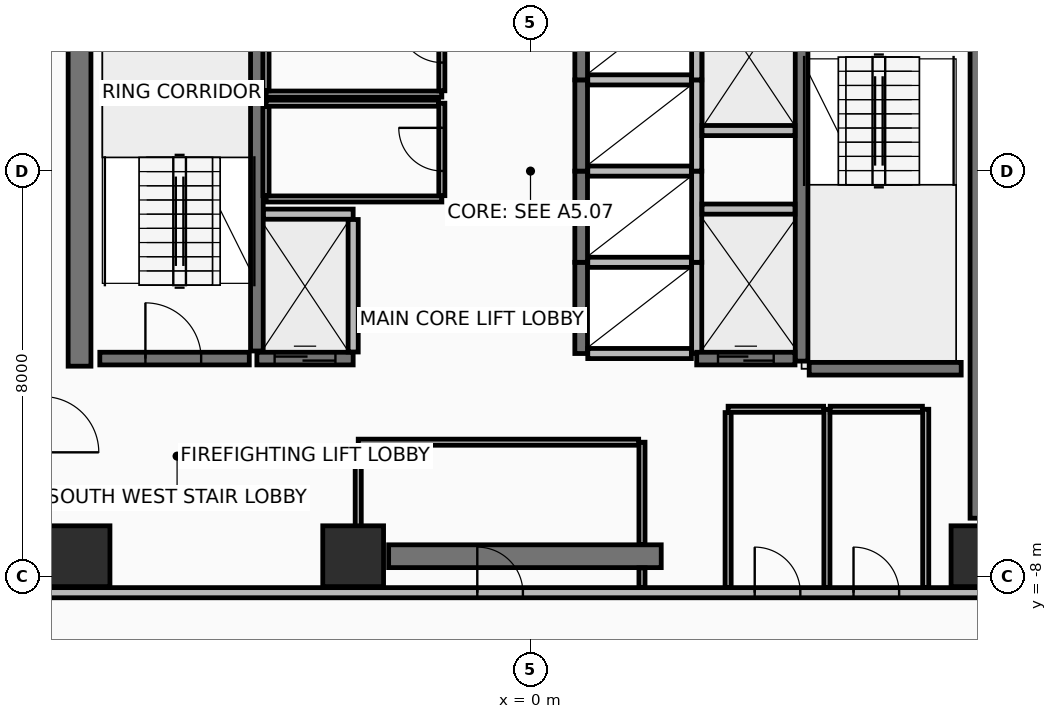
"""IFC4 building model, lengths in metres.
Left out: names, types, materials, properties, quantities, classifications, styles, units other than length and angle.
Written with IfcOpenShell. Run it as: python <this file> out.ifc"""

import sys

from ifc_helpers import new_model, si_unit, direction, frame, frame_2d, origin, origin_2d, place, context, subcontext, project, spatial, rectangle, extrude, element, fill, save


model = new_model("IFC4")
c1 = context("Model", 3, precision=1e-05, world=origin(), true_north=direction((0.0, 1.0)))
c2 = subcontext(c1, "Body", "Model", "MODEL_VIEW")
j1 = project(units=[si_unit("LENGTHUNIT", "METRE"), si_unit("PLANEANGLEUNIT", "RADIAN")], contexts=[c1])
p1 = place(None, origin())
s1 = spatial("IfcSite", under=j1, at=p1, CompositionType="ELEMENT")
p2 = place(p1, origin())
s2 = spatial("IfcBuilding", under=s1, at=p2, CompositionType="ELEMENT")
p3 = place(p2, frame((0.0, 0.0, 100.5)))
s3 = spatial("IfcBuildingStorey", under=s2, at=p3, CompositionType="ELEMENT", Elevation=100.5)
for number, where, z_axis, x_axis in (
    (1, (-8.9, -7.6, 0.0), (0.0, 0.0, 1.0), (1.0, 0.0, 0.0)),
    (2, (-3.5, -7.6, 0.0), (0.0, 0.0, 1.0), (1.0, 0.0, 0.0)),
    (3, (8.9, -7.6, 0.0), (0.0, 0.0, 1.0), (1.0, 0.0, 0.0)),
):
    element("IfcColumn", number, at=place(p3, frame(where, z_axis=z_axis, x_axis=x_axis)), inside=s3, PredefinedType="COLUMN", context=c2, shape_type="SweptSolid", body=[
        extrude(rectangle(XDim=1.2, YDim=1.2, at=origin_2d()), origin(), (0.0, 0.0, 1.0), 3.6),
    ])
p4 = place(p3, frame((-2.8, -7.6, 0.0), z_axis=(0.0, 0.0, 1.0), x_axis=(1.0, 0.0, 0.0)))
e4 = element("IfcWall", 4, at=p4, inside=s3, PredefinedType="SHEAR", context=c2, shape_type="SweptSolid", body=[
    extrude(rectangle(XDim=5.38, YDim=0.45, at=frame_2d((2.69, 0.0))), origin(), (0.0, 0.0, 1.0), 3.41),
])
for number, where, z_axis, x_axis in (
    (5, (-8.9, -3.85, 0.0), (0.0, 0.0, 1.0), (0.0, 1.0, 0.0)),
    (6, (8.9, -6.85, 0.0), (0.0, 0.0, 1.0), (0.0, 1.0, 0.0)),
):
    element("IfcWall", number, at=place(p3, frame(where, z_axis=z_axis, x_axis=x_axis)), inside=s3, PredefinedType="SHEAR", context=c2, shape_type="SweptSolid", body=[
        extrude(rectangle(XDim=10.7, YDim=0.45, at=frame_2d((5.35, 0.0))), origin(), (0.0, 0.0, 1.0), 3.41),
    ])
p5 = place(p3, frame((-9.62, -8.32, 0.0), z_axis=(0.0, 0.0, 1.0), x_axis=(1.0, 0.0, 0.0)))
e7 = element("IfcWall", 7, at=p5, inside=s3, PredefinedType="PARTITIONING", context=c2, shape_type="SweptSolid", body=[
    extrude(rectangle(XDim=19.24, YDim=0.2, at=frame_2d((9.62, 0.0))), origin(), (0.0, 0.0, 1.0), 2.805),
])
p6 = place(p5, frame((8.57, 0.0, 0.0)))
e8 = element("IfcOpeningElement", 8, at=p6, cuts=e7, PredefinedType="OPENING", context=c2, shape_type="SweptSolid", body=[
    extrude(rectangle(XDim=0.9, YDim=2.1, at=frame_2d((0.45, 1.05))), frame((0.0, 0.11, 0.0), z_axis=(0.0, -1.0, 0.0), x_axis=(1.0, 0.0, 0.0)), (0.0, 0.0, 1.0), 0.22),
])
p7 = place(p5, frame((14.045, 0.0, 0.0)))
e9 = element("IfcOpeningElement", 9, at=p7, cuts=e7, PredefinedType="OPENING", context=c2, shape_type="SweptSolid", body=[
    extrude(rectangle(XDim=0.9, YDim=2.1, at=frame_2d((0.45, 1.05))), frame((0.0, 0.11, 0.0), z_axis=(0.0, -1.0, 0.0), x_axis=(1.0, 0.0, 0.0)), (0.0, 0.0, 1.0), 0.22),
])
p8 = place(p5, frame((15.995, 0.0, 0.0)))
e10 = element("IfcOpeningElement", 10, at=p8, cuts=e7, PredefinedType="OPENING", context=c2, shape_type="SweptSolid", body=[
    extrude(rectangle(XDim=0.9, YDim=2.1, at=frame_2d((0.45, 1.05))), frame((0.0, 0.11, 0.0), z_axis=(0.0, -1.0, 0.0), x_axis=(1.0, 0.0, 0.0)), (0.0, 0.0, 1.0), 0.22),
])
p9 = place(p3, frame((-5.4, -3.55, 0.0), z_axis=(0.0, 0.0, 1.0), x_axis=(0.0, 1.0, 0.0)))
e11 = element("IfcWall", 11, at=p9, inside=s3, PredefinedType="SHEAR", context=c2, shape_type="SweptSolid", body=[
    extrude(rectangle(XDim=7.3, YDim=0.25, at=frame_2d((3.65, 0.0))), origin(), (0.0, 0.0, 1.0), 3.41),
])
p10 = place(p3, frame((-8.5, -3.7, 0.0), z_axis=(0.0, 0.0, 1.0), x_axis=(1.0, 0.0, 0.0)))
e12 = element("IfcWall", 12, at=p10, inside=s3, PredefinedType="SHEAR", context=c2, shape_type="SweptSolid", body=[
    extrude(rectangle(XDim=2.95, YDim=0.25, at=frame_2d((1.475, 0.0))), origin(), (0.0, 0.0, 1.0), 3.41),
])
p11 = place(p10, frame((0.9, 0.0, 0.0)))
e13 = element("IfcOpeningElement", 13, at=p11, cuts=e12, PredefinedType="OPENING", context=c2, shape_type="SweptSolid", body=[
    extrude(rectangle(XDim=1.1, YDim=2.15, at=frame_2d((0.55, 1.075))), frame((0.0, 0.135, 0.0), z_axis=(0.0, -1.0, 0.0), x_axis=(1.0, 0.0, 0.0)), (0.0, 0.0, 1.0), 0.27),
])
p12 = place(p3, frame((5.35, -3.75, 0.0), z_axis=(0.0, 0.0, 1.0), x_axis=(0.0, 1.0, 0.0)))
e14 = element("IfcWall", 14, at=p12, inside=s3, PredefinedType="SHEAR", context=c2, shape_type="SweptSolid", body=[
    extrude(rectangle(XDim=7.3, YDim=0.25, at=frame_2d((3.65, 0.0))), origin(), (0.0, 0.0, 1.0), 3.41),
])
p13 = place(p3, frame((5.5, -3.9, 0.0), z_axis=(0.0, 0.0, 1.0), x_axis=(1.0, 0.0, 0.0)))
e15 = element("IfcWall", 15, at=p13, inside=s3, PredefinedType="SHEAR", context=c2, shape_type="SweptSolid", body=[
    extrude(rectangle(XDim=3.0, YDim=0.25, at=frame_2d((1.5, 0.0))), origin(), (0.0, 0.0, 1.0), 3.41),
])
p14 = place(p3, frame((1.0, -3.6, 0.0), z_axis=(0.0, 0.0, 1.0), x_axis=(0.0, 1.0, 0.0)))
e16 = element("IfcWall", 16, at=p14, inside=s3, PredefinedType="SHEAR", context=c2, shape_type="SweptSolid", body=[
    extrude(rectangle(XDim=1.8, YDim=0.25, at=frame_2d((0.9, 0.0))), origin(), (0.0, 0.0, 1.0), 3.41),
])
p15 = place(p3, frame((3.28, -3.6, 0.0), z_axis=(0.0, 0.0, 1.0), x_axis=(0.0, 1.0, 0.0)))
e17 = element("IfcWall", 17, at=p15, inside=s3, PredefinedType="PARTITIONING", context=c2, shape_type="SweptSolid", body=[
    extrude(rectangle(XDim=1.8, YDim=0.2, at=frame_2d((0.9, 0.0))), origin(), (0.0, 0.0, 1.0), 3.41),
])
for number, where, z_axis, x_axis in (
    (18, (1.13, -3.6, 0.0), (0.0, 0.0, 1.0), (1.0, 0.0, 0.0)),
    (19, (1.13, -1.8, 0.0), (0.0, 0.0, 1.0), (1.0, 0.0, 0.0)),
):
    element("IfcWall", number, at=place(p3, frame(where, z_axis=z_axis, x_axis=x_axis)), inside=s3, PredefinedType="PARTITIONING", context=c2, shape_type="SweptSolid", body=[
        extrude(rectangle(XDim=2.045, YDim=0.2, at=frame_2d((1.022, 0.0))), origin(), (0.0, 0.0, 1.0), 3.41),
    ])
p16 = place(p3, frame((1.0, -1.8, 0.0), z_axis=(0.0, 0.0, 1.0), x_axis=(0.0, 1.0, 0.0)))
e20 = element("IfcWall", 20, at=p16, inside=s3, PredefinedType="SHEAR", context=c2, shape_type="SweptSolid", body=[
    extrude(rectangle(XDim=1.8, YDim=0.25, at=frame_2d((0.9, 0.0))), origin(), (0.0, 0.0, 1.0), 3.41),
])
p17 = place(p3, frame((3.28, -1.8, 0.0), z_axis=(0.0, 0.0, 1.0), x_axis=(0.0, 1.0, 0.0)))
e21 = element("IfcWall", 21, at=p17, inside=s3, PredefinedType="PARTITIONING", context=c2, shape_type="SweptSolid", body=[
    extrude(rectangle(XDim=1.8, YDim=0.2, at=frame_2d((0.9, 0.0))), origin(), (0.0, 0.0, 1.0), 3.41),
])
p18 = place(p3, frame((1.13, 0.0, 0.0), z_axis=(0.0, 0.0, 1.0), x_axis=(1.0, 0.0, 0.0)))
e22 = element("IfcWall", 22, at=p18, inside=s3, PredefinedType="PARTITIONING", context=c2, shape_type="SweptSolid", body=[
    extrude(rectangle(XDim=2.045, YDim=0.2, at=frame_2d((1.022, 0.0))), origin(), (0.0, 0.0, 1.0), 3.41),
])
p19 = place(p3, frame((1.0, 0.0, 0.0), z_axis=(0.0, 0.0, 1.0), x_axis=(0.0, 1.0, 0.0)))
e23 = element("IfcWall", 23, at=p19, inside=s3, PredefinedType="SHEAR", context=c2, shape_type="SweptSolid", body=[
    extrude(rectangle(XDim=1.8, YDim=0.25, at=frame_2d((0.9, 0.0))), origin(), (0.0, 0.0, 1.0), 3.41),
])
p20 = place(p3, frame((3.28, 0.0, 0.0), z_axis=(0.0, 0.0, 1.0), x_axis=(0.0, 1.0, 0.0)))
e24 = element("IfcWall", 24, at=p20, inside=s3, PredefinedType="PARTITIONING", context=c2, shape_type="SweptSolid", body=[
    extrude(rectangle(XDim=1.8, YDim=0.2, at=frame_2d((0.9, 0.0))), origin(), (0.0, 0.0, 1.0), 3.41),
])
p21 = place(p3, frame((1.13, 1.8, 0.0), z_axis=(0.0, 0.0, 1.0), x_axis=(1.0, 0.0, 0.0)))
e25 = element("IfcWall", 25, at=p21, inside=s3, PredefinedType="PARTITIONING", context=c2, shape_type="SweptSolid", body=[
    extrude(rectangle(XDim=2.045, YDim=0.2, at=frame_2d((1.022, 0.0))), origin(), (0.0, 0.0, 1.0), 3.41),
])
p22 = place(p3, frame((1.0, 1.8, 0.0), z_axis=(0.0, 0.0, 1.0), x_axis=(0.0, 1.0, 0.0)))
e26 = element("IfcWall", 26, at=p22, inside=s3, PredefinedType="SHEAR", context=c2, shape_type="SweptSolid", body=[
    extrude(rectangle(XDim=1.8, YDim=0.25, at=frame_2d((0.9, 0.0))), origin(), (0.0, 0.0, 1.0), 3.41),
])
p23 = place(p3, frame((3.28, 1.8, 0.0), z_axis=(0.0, 0.0, 1.0), x_axis=(0.0, 1.0, 0.0)))
e27 = element("IfcWall", 27, at=p23, inside=s3, PredefinedType="PARTITIONING", context=c2, shape_type="SweptSolid", body=[
    extrude(rectangle(XDim=1.8, YDim=0.2, at=frame_2d((0.9, 0.0))), origin(), (0.0, 0.0, 1.0), 3.41),
])
p24 = place(p3, frame((-5.4, -3.7, 0.0), z_axis=(0.0, 0.0, 1.0), x_axis=(1.0, 0.0, 0.0)))
e28 = element("IfcWall", 28, at=p24, inside=s3, PredefinedType="SHEAR", context=c2, shape_type="SweptSolid", body=[
    extrude(rectangle(XDim=1.9, YDim=0.25, at=frame_2d((0.95, 0.0))), origin(), (0.0, 0.0, 1.0), 3.41),
])
p25 = place(p24, frame((0.35, 0.0, 0.0)))
e29 = element("IfcOpeningElement", 29, at=p25, cuts=e28, PredefinedType="OPENING", context=c2, shape_type="SweptSolid", body=[
    extrude(rectangle(XDim=1.2, YDim=2.2, at=frame_2d((0.6, 1.1))), frame((0.0, 0.135, 0.0), z_axis=(0.0, -1.0, 0.0), x_axis=(1.0, 0.0, 0.0)), (0.0, 0.0, 1.0), 0.27),
])
p26 = place(p3, frame((-5.27, -0.85, 0.0), z_axis=(0.0, 0.0, 1.0), x_axis=(1.0, 0.0, 0.0)))
e30 = element("IfcWall", 30, at=p26, inside=s3, PredefinedType="PARTITIONING", context=c2, shape_type="SweptSolid", body=[
    extrude(rectangle(XDim=1.77, YDim=0.2, at=frame_2d((0.885, 0.0))), origin(), (0.0, 0.0, 1.0), 3.41),
])
p27 = place(p3, frame((-3.5, -3.57, 0.0), z_axis=(0.0, 0.0, 1.0), x_axis=(0.0, 1.0, 0.0)))
e31 = element("IfcWall", 31, at=p27, inside=s3, PredefinedType="PARTITIONING", context=c2, shape_type="SweptSolid", body=[
    extrude(rectangle(XDim=2.615, YDim=0.2, at=frame_2d((1.308, 0.0))), origin(), (0.0, 0.0, 1.0), 3.41),
])
p28 = place(p3, frame((3.385, 0.8, 0.0), z_axis=(0.0, 0.0, 1.0), x_axis=(1.0, 0.0, 0.0)))
e32 = element("IfcWall", 32, at=p28, inside=s3, PredefinedType="PARTITIONING", context=c2, shape_type="SweptSolid", body=[
    extrude(rectangle(XDim=1.835, YDim=0.2, at=frame_2d((0.917, 0.0))), origin(), (0.0, 0.0, 1.0), 3.41),
])
p29 = place(p3, frame((3.28, -3.7, 0.0), z_axis=(0.0, 0.0, 1.0), x_axis=(1.0, 0.0, 0.0)))
e33 = element("IfcWall", 33, at=p29, inside=s3, PredefinedType="SHEAR", context=c2, shape_type="SweptSolid", body=[
    extrude(rectangle(XDim=1.94, YDim=0.25, at=frame_2d((0.97, 0.0))), origin(), (0.0, 0.0, 1.0), 3.41),
])
p30 = place(p29, frame((0.42, 0.0, 0.0)))
e34 = element("IfcOpeningElement", 34, at=p30, cuts=e33, PredefinedType="OPENING", context=c2, shape_type="SweptSolid", body=[
    extrude(rectangle(XDim=1.1, YDim=2.2, at=frame_2d((0.55, 1.1))), frame((0.0, 0.135, 0.0), z_axis=(0.0, -1.0, 0.0), x_axis=(1.0, 0.0, 0.0)), (0.0, 0.0, 1.0), 0.27),
])
p31 = place(p3, frame((3.385, -0.75, 0.0), z_axis=(0.0, 0.0, 1.0), x_axis=(1.0, 0.0, 0.0)))
e35 = element("IfcWall", 35, at=p31, inside=s3, PredefinedType="PARTITIONING", context=c2, shape_type="SweptSolid", body=[
    extrude(rectangle(XDim=1.835, YDim=0.2, at=frame_2d((0.917, 0.0))), origin(), (0.0, 0.0, 1.0), 3.41),
])
p32 = place(p3, frame((-5.22, 1.52, 0.0), z_axis=(0.0, 0.0, 1.0), x_axis=(1.0, 0.0, 0.0)))
e36 = element("IfcWall", 36, at=p32, inside=s3, PredefinedType="PARTITIONING", context=c2, shape_type="SweptSolid", body=[
    extrude(rectangle(XDim=3.47, YDim=0.12, at=frame_2d((1.735, 0.0))), origin(), (0.0, 0.0, 1.0), 3.41),
])
p33 = place(p3, frame((-1.75, 1.585, 0.0), z_axis=(0.0, 0.0, 1.0), x_axis=(0.0, 1.0, 0.0)))
e37 = element("IfcWall", 37, at=p33, inside=s3, PredefinedType="PARTITIONING", context=c2, shape_type="SweptSolid", body=[
    extrude(rectangle(XDim=1.965, YDim=0.12, at=frame_2d((0.982, 0.0))), origin(), (0.0, 0.0, 1.0), 3.41),
])
p34 = place(p33, frame((0.557, 0.0, 0.0)))
e38 = element("IfcOpeningElement", 38, at=p34, cuts=e37, PredefinedType="OPENING", context=c2, shape_type="SweptSolid", body=[
    extrude(rectangle(XDim=0.85, YDim=2.1, at=frame_2d((0.425, 1.05))), frame((0.0, 0.07, 0.0), z_axis=(0.0, -1.0, 0.0), x_axis=(1.0, 0.0, 0.0)), (0.0, 0.0, 1.0), 0.14),
])
p35 = place(p3, frame((-5.22, 3.485, 0.0), z_axis=(0.0, 0.0, 1.0), x_axis=(0.0, -1.0, 0.0)))
e39 = element("IfcWall", 39, at=p35, inside=s3, PredefinedType="PARTITIONING", context=c2, shape_type="SweptSolid", body=[
    extrude(rectangle(XDim=1.9, YDim=0.12, at=frame_2d((0.95, 0.0))), origin(), (0.0, 0.0, 1.0), 3.41),
])
p36 = place(p3, frame((-5.22, -0.55, 0.0), z_axis=(0.0, 0.0, 1.0), x_axis=(1.0, 0.0, 0.0)))
e40 = element("IfcWall", 40, at=p36, inside=s3, PredefinedType="PARTITIONING", context=c2, shape_type="SweptSolid", body=[
    extrude(rectangle(XDim=3.47, YDim=0.12, at=frame_2d((1.735, 0.0))), origin(), (0.0, 0.0, 1.0), 3.41),
])
p37 = place(p3, frame((-1.75, -0.485, 0.0), z_axis=(0.0, 0.0, 1.0), x_axis=(0.0, 1.0, 0.0)))
e41 = element("IfcWall", 41, at=p37, inside=s3, PredefinedType="PARTITIONING", context=c2, shape_type="SweptSolid", body=[
    extrude(rectangle(XDim=1.825, YDim=0.12, at=frame_2d((0.913, 0.0))), origin(), (0.0, 0.0, 1.0), 3.41),
])
p38 = place(p37, frame((0.488, 0.0, 0.0)))
e42 = element("IfcOpeningElement", 42, at=p38, cuts=e41, PredefinedType="OPENING", context=c2, shape_type="SweptSolid", body=[
    extrude(rectangle(XDim=0.85, YDim=2.1, at=frame_2d((0.425, 1.05))), frame((0.0, 0.07, 0.0), z_axis=(0.0, -1.0, 0.0), x_axis=(1.0, 0.0, 0.0)), (0.0, 0.0, 1.0), 0.14),
])
p39 = place(p3, frame((-1.815, 1.34, 0.0), z_axis=(0.0, 0.0, 1.0), x_axis=(-1.0, 0.0, 0.0)))
e43 = element("IfcWall", 43, at=p39, inside=s3, PredefinedType="PARTITIONING", context=c2, shape_type="SweptSolid", body=[
    extrude(rectangle(XDim=3.405, YDim=0.12, at=frame_2d((1.703, 0.0))), origin(), (0.0, 0.0, 1.0), 3.41),
])
p40 = place(p3, frame((-5.22, 1.275, 0.0), z_axis=(0.0, 0.0, 1.0), x_axis=(0.0, -1.0, 0.0)))
e44 = element("IfcWall", 44, at=p40, inside=s3, PredefinedType="PARTITIONING", context=c2, shape_type="SweptSolid", body=[
    extrude(rectangle(XDim=1.76, YDim=0.12, at=frame_2d((0.88, 0.0))), origin(), (0.0, 0.0, 1.0), 3.41),
])
p41 = place(p3, frame((2.2, -8.215, 0.0), z_axis=(0.0, 0.0, 1.0), x_axis=(0.0, 1.0, 0.0)))
e45 = element("IfcWall", 45, at=p41, inside=s3, PredefinedType="PARTITIONING", context=c2, shape_type="SweptSolid", body=[
    extrude(rectangle(XDim=0.385, YDim=0.12, at=frame_2d((0.192, 0.0))), origin(), (0.0, 0.0, 1.0), 2.605),
])
p42 = place(p3, frame((2.2, -7.37, 0.0), z_axis=(0.0, 0.0, 1.0), x_axis=(0.0, 1.0, 0.0)))
e46 = element("IfcWall", 46, at=p42, inside=s3, PredefinedType="PARTITIONING", context=c2, shape_type="SweptSolid", body=[
    extrude(rectangle(XDim=2.02, YDim=0.12, at=frame_2d((1.01, 0.0))), origin(), (0.0, 0.0, 1.0), 2.605),
])
p43 = place(p3, frame((2.135, -5.35, 0.0), z_axis=(0.0, 0.0, 1.0), x_axis=(-1.0, 0.0, 0.0)))
e47 = element("IfcWall", 47, at=p43, inside=s3, PredefinedType="PARTITIONING", context=c2, shape_type="SweptSolid", body=[
    extrude(rectangle(XDim=5.535, YDim=0.12, at=frame_2d((2.768, 0.0))), origin(), (0.0, 0.0, 1.0), 2.605),
])
p44 = place(p3, frame((-3.4, -5.415, 0.0), z_axis=(0.0, 0.0, 1.0), x_axis=(0.0, -1.0, 0.0)))
e48 = element("IfcWall", 48, at=p44, inside=s3, PredefinedType="PARTITIONING", context=c2, shape_type="SweptSolid", body=[
    extrude(rectangle(XDim=2.8, YDim=0.12, at=frame_2d((1.4, 0.0))), origin(), (0.0, 0.0, 1.0), 2.605),
])
p45 = place(p3, frame((5.85, -8.215, 0.0), z_axis=(0.0, 0.0, 1.0), x_axis=(0.0, 1.0, 0.0)))
e49 = element("IfcWall", 49, at=p45, inside=s3, PredefinedType="PARTITIONING", context=c2, shape_type="SweptSolid", body=[
    extrude(rectangle(XDim=3.515, YDim=0.12, at=frame_2d((1.758, 0.0))), origin(), (0.0, 0.0, 1.0), 2.605),
])
p46 = place(p3, frame((5.785, -4.7, 0.0), z_axis=(0.0, 0.0, 1.0), x_axis=(-1.0, 0.0, 0.0)))
e50 = element("IfcWall", 50, at=p46, inside=s3, PredefinedType="PARTITIONING", context=c2, shape_type="SweptSolid", body=[
    extrude(rectangle(XDim=1.885, YDim=0.12, at=frame_2d((0.942, 0.0))), origin(), (0.0, 0.0, 1.0), 3.41),
])
p47 = place(p3, frame((3.9, -4.765, 0.0), z_axis=(0.0, 0.0, 1.0), x_axis=(0.0, -1.0, 0.0)))
e51 = element("IfcWall", 51, at=p47, inside=s3, PredefinedType="PARTITIONING", context=c2, shape_type="SweptSolid", body=[
    extrude(rectangle(XDim=3.45, YDim=0.12, at=frame_2d((1.725, 0.0))), origin(), (0.0, 0.0, 1.0), 2.605),
])
p48 = place(p3, frame((7.8, -8.215, 0.0), z_axis=(0.0, 0.0, 1.0), x_axis=(0.0, 1.0, 0.0)))
e52 = element("IfcWall", 52, at=p48, inside=s3, PredefinedType="PARTITIONING", context=c2, shape_type="SweptSolid", body=[
    extrude(rectangle(XDim=3.515, YDim=0.12, at=frame_2d((1.758, 0.0))), origin(), (0.0, 0.0, 1.0), 2.605),
])
p49 = place(p3, frame((7.735, -4.7, 0.0), z_axis=(0.0, 0.0, 1.0), x_axis=(-1.0, 0.0, 0.0)))
e53 = element("IfcWall", 53, at=p49, inside=s3, PredefinedType="PARTITIONING", context=c2, shape_type="SweptSolid", body=[
    extrude(rectangle(XDim=1.82, YDim=0.12, at=frame_2d((0.91, 0.0))), origin(), (0.0, 0.0, 1.0), 3.41),
])
p50 = place(p11, origin())
e54 = element("IfcDoor", 54, at=p50, inside=s3, OperationType="SINGLE_SWING_LEFT", PredefinedType="DOOR", context=c2, shape_type="SweptSolid", body=[
    extrude(rectangle(XDim=1.1, YDim=2.15, at=frame_2d((0.55, 1.075))), frame((0.0, 0.025, 0.0), z_axis=(0.0, -1.0, 0.0), x_axis=(1.0, 0.0, 0.0)), (0.0, 0.0, 1.0), 0.05),
])
fill(e13, e54)
p51 = place(p25, origin())
e55 = element("IfcDoor", 55, at=p51, inside=s3, OperationType="SLIDING_TO_RIGHT", PredefinedType="DOOR", context=c2, shape_type="SweptSolid", body=[
    extrude(rectangle(XDim=1.2, YDim=2.2, at=frame_2d((0.6, 1.1))), frame((0.0, 0.025, 0.0), z_axis=(0.0, -1.0, 0.0), x_axis=(1.0, 0.0, 0.0)), (0.0, 0.0, 1.0), 0.05),
])
fill(e29, e55)
p52 = place(p30, origin())
e56 = element("IfcDoor", 56, at=p52, inside=s3, OperationType="SLIDING_TO_LEFT", PredefinedType="DOOR", context=c2, shape_type="SweptSolid", body=[
    extrude(rectangle(XDim=1.1, YDim=2.2, at=frame_2d((0.55, 1.1))), frame((0.0, 0.025, 0.0), z_axis=(0.0, -1.0, 0.0), x_axis=(1.0, 0.0, 0.0)), (0.0, 0.0, 1.0), 0.05),
])
fill(e34, e56)
p53 = place(p34, frame((0.85, 0.0, 0.0), z_axis=(0.0, 0.0, 1.0), x_axis=(-1.0, 0.0, 0.0)))
e57 = element("IfcDoor", 57, at=p53, inside=s3, OperationType="SINGLE_SWING_RIGHT", PredefinedType="DOOR", context=c2, shape_type="SweptSolid", body=[
    extrude(rectangle(XDim=0.85, YDim=2.1, at=frame_2d((0.425, 1.05))), frame((0.0, 0.025, 0.0), z_axis=(0.0, -1.0, 0.0), x_axis=(1.0, 0.0, 0.0)), (0.0, 0.0, 1.0), 0.05),
])
fill(e38, e57)
p54 = place(p38, frame((0.85, 0.0, 0.0), z_axis=(0.0, 0.0, 1.0), x_axis=(-1.0, 0.0, 0.0)))
e58 = element("IfcDoor", 58, at=p54, inside=s3, OperationType="SINGLE_SWING_RIGHT", PredefinedType="DOOR", context=c2, shape_type="SweptSolid", body=[
    extrude(rectangle(XDim=0.85, YDim=2.1, at=frame_2d((0.425, 1.05))), frame((0.0, 0.025, 0.0), z_axis=(0.0, -1.0, 0.0), x_axis=(1.0, 0.0, 0.0)), (0.0, 0.0, 1.0), 0.05),
])
fill(e42, e58)
p55 = place(p6, origin())
e59 = element("IfcDoor", 59, at=p55, inside=s3, OperationType="SINGLE_SWING_LEFT", PredefinedType="DOOR", context=c2, shape_type="SweptSolid", body=[
    extrude(rectangle(XDim=0.9, YDim=2.1, at=frame_2d((0.45, 1.05))), frame((0.0, 0.025, 0.0), z_axis=(0.0, -1.0, 0.0), x_axis=(1.0, 0.0, 0.0)), (0.0, 0.0, 1.0), 0.05),
])
fill(e8, e59)
p56 = place(p7, origin())
e60 = element("IfcDoor", 60, at=p56, inside=s3, OperationType="SINGLE_SWING_LEFT", PredefinedType="DOOR", context=c2, shape_type="SweptSolid", body=[
    extrude(rectangle(XDim=0.9, YDim=2.1, at=frame_2d((0.45, 1.05))), frame((0.0, 0.025, 0.0), z_axis=(0.0, -1.0, 0.0), x_axis=(1.0, 0.0, 0.0)), (0.0, 0.0, 1.0), 0.05),
])
fill(e9, e60)
p57 = place(p8, origin())
e61 = element("IfcDoor", 61, at=p57, inside=s3, OperationType="SINGLE_SWING_LEFT", PredefinedType="DOOR", context=c2, shape_type="SweptSolid", body=[
    extrude(rectangle(XDim=0.9, YDim=2.1, at=frame_2d((0.45, 1.05))), frame((0.0, 0.025, 0.0), z_axis=(0.0, -1.0, 0.0), x_axis=(1.0, 0.0, 0.0)), (0.0, 0.0, 1.0), 0.05),
])
fill(e10, e61)
save(model, sys.argv[1])
